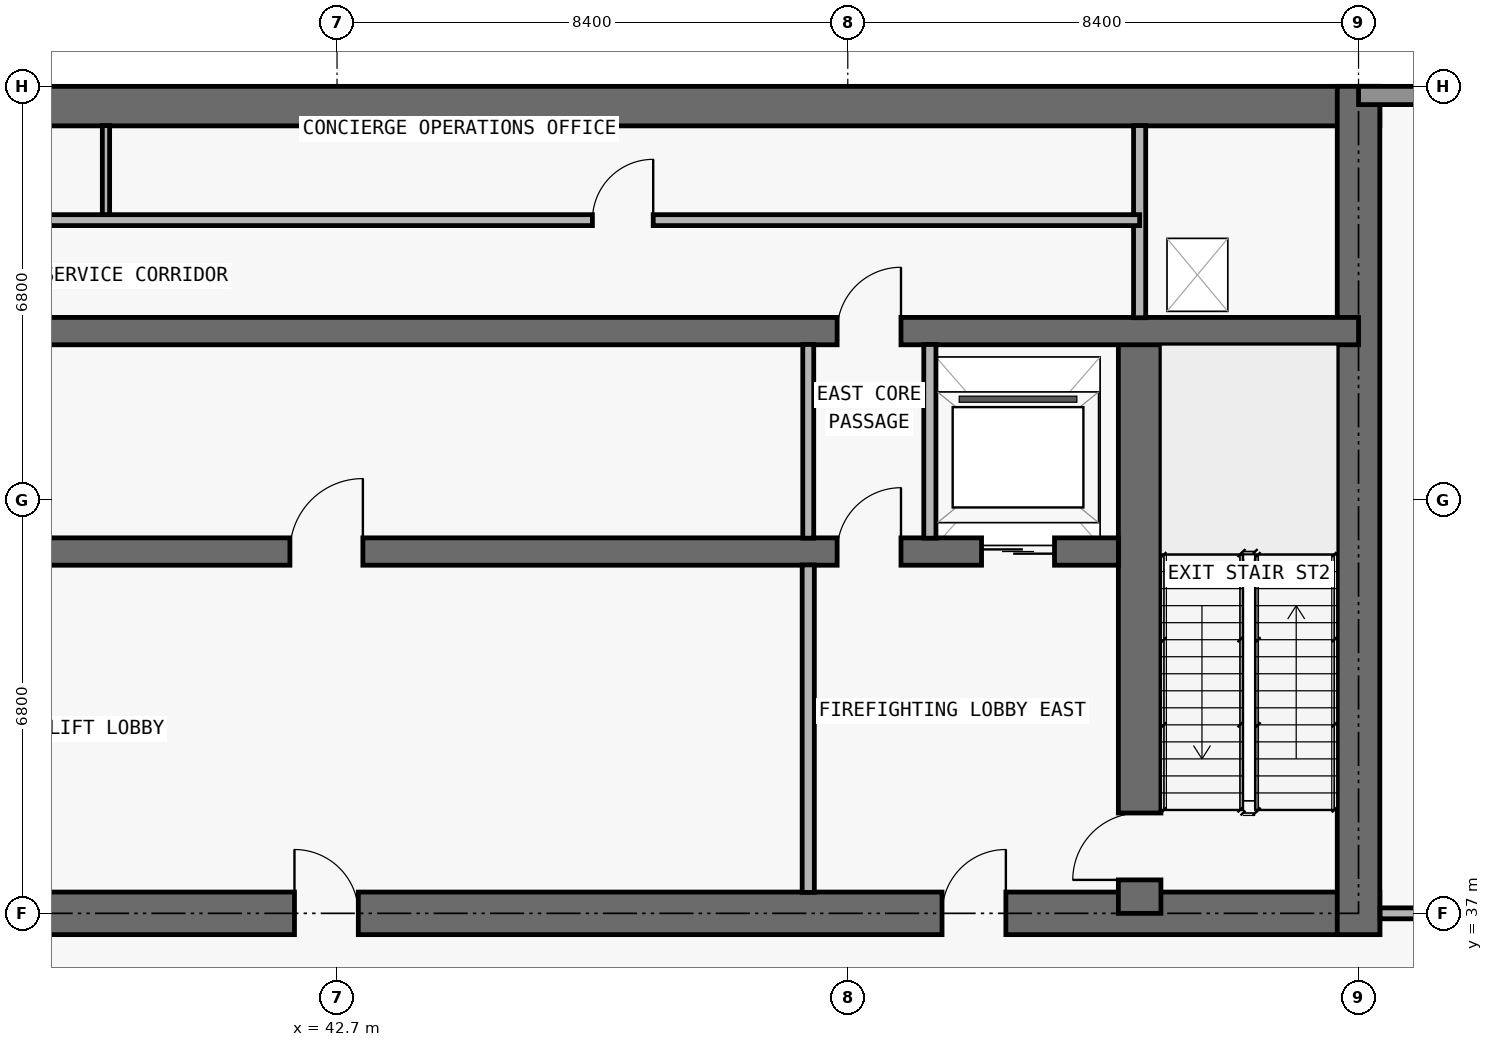
"""IFC4 building model, lengths in metres.
Left out: names, types, materials, properties, quantities, classifications, styles, units other than length and angle.
Written with IfcOpenShell. Run it as: python <this file> out.ifc"""

import sys

from ifc_helpers import new_model, si_unit, direction, frame, frame_2d, origin, place, context, subcontext, project, spatial, rectangle, extrude, element, fill, save


model = new_model("IFC4")
c1 = context("Model", 3, precision=1e-05, world=origin(), true_north=direction((0.0, 1.0)))
c2 = subcontext(c1, "Body", "Model", "MODEL_VIEW")
j1 = project(units=[si_unit("LENGTHUNIT", "METRE"), si_unit("PLANEANGLEUNIT", "RADIAN")], contexts=[c1])
p1 = place(None, origin())
s1 = spatial("IfcSite", under=j1, at=p1, CompositionType="ELEMENT")
p2 = place(p1, origin())
s2 = spatial("IfcBuilding", under=s1, at=p2, CompositionType="ELEMENT")
p3 = place(p2, frame((0.0, 0.0, 284.8)))
s3 = spatial("IfcBuildingStorey", under=s2, at=p3, CompositionType="ELEMENT", Elevation=284.8)
p4 = place(p3, frame((17.95, 37.0, 0.0), z_axis=(0.0, 0.0, 1.0), x_axis=(1.0, 0.0, 0.0)))
e1 = element("IfcWall", 1, at=p4, inside=s3, PredefinedType="SHEAR", context=c2, shape_type="SweptSolid", body=[
    extrude(rectangle(XDim=41.9, YDim=0.7, at=frame_2d((20.95, 0.0))), origin(), (0.0, 0.0, 1.0), 5.1),
])
p5 = place(p4, frame((14.312, 0.0, 0.0)))
e2 = element("IfcOpeningElement", 2, at=p5, cuts=e1, PredefinedType="OPENING", context=c2, shape_type="SweptSolid", body=[
    extrude(rectangle(XDim=1.2, YDim=2.2, at=frame_2d((0.6, 1.1))), frame((0.0, 0.36, 0.0), z_axis=(0.0, -1.0, 0.0), x_axis=(1.0, 0.0, 0.0)), (0.0, 0.0, 1.0), 0.72),
])
p6 = place(p4, frame((6.2, 0.0, 0.0)))
e3 = element("IfcOpeningElement", 3, at=p6, cuts=e1, PredefinedType="OPENING", context=c2, shape_type="SweptSolid", body=[
    extrude(rectangle(XDim=1.05, YDim=2.15, at=frame_2d((0.525, 1.075))), frame((0.0, 0.36, 0.0), z_axis=(0.0, -1.0, 0.0), x_axis=(1.0, 0.0, 0.0)), (0.0, 0.0, 1.0), 0.72),
])
p7 = place(p4, frame((34.7, 0.0, 0.0)))
e4 = element("IfcOpeningElement", 4, at=p7, cuts=e1, PredefinedType="OPENING", context=c2, shape_type="SweptSolid", body=[
    extrude(rectangle(XDim=1.05, YDim=2.15, at=frame_2d((0.525, 1.075))), frame((0.0, 0.36, 0.0), z_axis=(0.0, -1.0, 0.0), x_axis=(1.0, 0.0, 0.0)), (0.0, 0.0, 1.0), 0.72),
])
p8 = place(p4, frame((10.812, 0.0, 0.0)))
e5 = element("IfcOpeningElement", 5, at=p8, cuts=e1, PredefinedType="OPENING", context=c2, shape_type="SweptSolid", body=[
    extrude(rectangle(XDim=1.05, YDim=2.15, at=frame_2d((0.525, 1.075))), frame((0.0, 0.36, 0.0), z_axis=(0.0, -1.0, 0.0), x_axis=(1.0, 0.0, 0.0)), (0.0, 0.0, 1.0), 0.72),
])
p9 = place(p4, frame((24.05, 0.0, 0.0)))
e6 = element("IfcOpeningElement", 6, at=p9, cuts=e1, PredefinedType="OPENING", context=c2, shape_type="SweptSolid", body=[
    extrude(rectangle(XDim=1.05, YDim=2.15, at=frame_2d((0.525, 1.075))), frame((0.0, 0.36, 0.0), z_axis=(0.0, -1.0, 0.0), x_axis=(1.0, 0.0, 0.0)), (0.0, 0.0, 1.0), 0.72),
])
p10 = place(p3, frame((17.95, 50.275, 0.0), z_axis=(0.0, 0.0, 1.0), x_axis=(1.0, 0.0, 0.0)))
e7 = element("IfcWall", 7, at=p10, inside=s3, PredefinedType="SHEAR", context=c2, shape_type="SweptSolid", body=[
    extrude(rectangle(XDim=41.9, YDim=0.65, at=frame_2d((20.95, 0.0))), origin(), (0.0, 0.0, 1.0), 5.1),
])
p11 = place(p3, frame((59.5, 36.65, 0.0), z_axis=(0.0, 0.0, 1.0), x_axis=(0.0, 1.0, 0.0)))
e8 = element("IfcWall", 8, at=p11, inside=s3, PredefinedType="SHEAR", context=c2, shape_type="SweptSolid", body=[
    extrude(rectangle(XDim=13.95, YDim=0.7, at=frame_2d((6.975, 0.0))), origin(), (0.0, 0.0, 1.0), 5.1),
])
p12 = place(p3, frame((55.9, 37.0, 0.0), z_axis=(0.0, 0.0, 1.0), x_axis=(0.0, 1.0, 0.0)))
e9 = element("IfcWall", 9, at=p12, inside=s3, PredefinedType="SHEAR", context=c2, shape_type="SweptSolid", body=[
    extrude(rectangle(XDim=9.575, YDim=0.7, at=frame_2d((4.788, 0.0))), origin(), (0.0, 0.0, 1.0), 5.1),
])
p13 = place(p12, frame((0.55, 0.0, 0.0)))
e10 = element("IfcOpeningElement", 10, at=p13, cuts=e9, PredefinedType="OPENING", context=c2, shape_type="SweptSolid", body=[
    extrude(rectangle(XDim=1.1, YDim=2.15, at=frame_2d((0.55, 1.075))), frame((0.0, 0.36, 0.0), z_axis=(0.0, -1.0, 0.0), x_axis=(1.0, 0.0, 0.0)), (0.0, 0.0, 1.0), 0.72),
])
p14 = place(p3, frame((22.25, 42.95, 0.0), z_axis=(0.0, 0.0, 1.0), x_axis=(1.0, 0.0, 0.0)))
e11 = element("IfcWall", 11, at=p14, inside=s3, PredefinedType="SHEAR", context=c2, shape_type="SweptSolid", body=[
    extrude(rectangle(XDim=33.3, YDim=0.45, at=frame_2d((16.65, 0.0))), origin(), (0.0, 0.0, 1.0), 5.1),
])
p15 = place(p14, frame((1.05, 0.0, 0.0)))
e12 = element("IfcOpeningElement", 12, at=p15, cuts=e11, PredefinedType="OPENING", context=c2, shape_type="SweptSolid", body=[
    extrude(rectangle(XDim=1.2, YDim=2.2, at=frame_2d((0.6, 1.1))), frame((0.0, 0.235, 0.0), z_axis=(0.0, -1.0, 0.0), x_axis=(1.0, 0.0, 0.0)), (0.0, 0.0, 1.0), 0.47),
])
p16 = place(p14, frame((31.05, 0.0, 0.0)))
e13 = element("IfcOpeningElement", 13, at=p16, cuts=e11, PredefinedType="OPENING", context=c2, shape_type="SweptSolid", body=[
    extrude(rectangle(XDim=1.2, YDim=2.2, at=frame_2d((0.6, 1.1))), frame((0.0, 0.235, 0.0), z_axis=(0.0, -1.0, 0.0), x_axis=(1.0, 0.0, 0.0)), (0.0, 0.0, 1.0), 0.47),
])
p17 = place(p14, frame((3.625, 0.0, 0.0)))
e14 = element("IfcOpeningElement", 14, at=p17, cuts=e11, PredefinedType="OPENING", context=c2, shape_type="SweptSolid", body=[
    extrude(rectangle(XDim=1.05, YDim=2.15, at=frame_2d((0.525, 1.075))), frame((0.0, 0.235, 0.0), z_axis=(0.0, -1.0, 0.0), x_axis=(1.0, 0.0, 0.0)), (0.0, 0.0, 1.0), 0.47),
])
p18 = place(p14, frame((28.675, 0.0, 0.0)))
e15 = element("IfcOpeningElement", 15, at=p18, cuts=e11, PredefinedType="OPENING", context=c2, shape_type="SweptSolid", body=[
    extrude(rectangle(XDim=1.05, YDim=2.15, at=frame_2d((0.525, 1.075))), frame((0.0, 0.235, 0.0), z_axis=(0.0, -1.0, 0.0), x_axis=(1.0, 0.0, 0.0)), (0.0, 0.0, 1.0), 0.47),
])
p19 = place(p14, frame((6.538, 0.0, 0.0)))
e16 = element("IfcOpeningElement", 16, at=p19, cuts=e11, PredefinedType="OPENING", context=c2, shape_type="SweptSolid", body=[
    extrude(rectangle(XDim=1.0, YDim=2.2, at=frame_2d((0.5, 1.1))), frame((0.0, 0.235, 0.0), z_axis=(0.0, -1.0, 0.0), x_axis=(1.0, 0.0, 0.0)), (0.0, 0.0, 1.0), 0.47),
])
p20 = place(p14, frame((19.675, 0.0, 0.0)))
e17 = element("IfcOpeningElement", 17, at=p20, cuts=e11, PredefinedType="OPENING", context=c2, shape_type="SweptSolid", body=[
    extrude(rectangle(XDim=1.2, YDim=2.2, at=frame_2d((0.6, 1.1))), frame((0.0, 0.235, 0.0), z_axis=(0.0, -1.0, 0.0), x_axis=(1.0, 0.0, 0.0)), (0.0, 0.0, 1.0), 0.47),
])
p21 = place(p3, frame((18.3, 46.575, 0.0), z_axis=(0.0, 0.0, 1.0), x_axis=(1.0, 0.0, 0.0)))
e18 = element("IfcWall", 18, at=p21, inside=s3, PredefinedType="SHEAR", context=c2, shape_type="SweptSolid", body=[
    extrude(rectangle(XDim=41.2, YDim=0.45, at=frame_2d((20.6, 0.0))), origin(), (0.0, 0.0, 1.0), 5.1),
])
p22 = place(p21, frame((7.575, 0.0, 0.0)))
e19 = element("IfcOpeningElement", 19, at=p22, cuts=e18, PredefinedType="OPENING", context=c2, shape_type="SweptSolid", body=[
    extrude(rectangle(XDim=1.05, YDim=2.15, at=frame_2d((0.525, 1.075))), frame((0.0, 0.235, 0.0), z_axis=(0.0, -1.0, 0.0), x_axis=(1.0, 0.0, 0.0)), (0.0, 0.0, 1.0), 0.47),
])
p23 = place(p21, frame((32.625, 0.0, 0.0)))
e20 = element("IfcOpeningElement", 20, at=p23, cuts=e18, PredefinedType="OPENING", context=c2, shape_type="SweptSolid", body=[
    extrude(rectangle(XDim=1.05, YDim=2.15, at=frame_2d((0.525, 1.075))), frame((0.0, 0.235, 0.0), z_axis=(0.0, -1.0, 0.0), x_axis=(1.0, 0.0, 0.0)), (0.0, 0.0, 1.0), 0.47),
])
p24 = place(p3, frame((59.5, 50.45, 0.0), z_axis=(0.0, 0.0, 1.0), x_axis=(1.0, 0.0, 0.0)))
e21 = element("IfcWall", 21, at=p24, inside=s3, PredefinedType="STANDARD", context=c2, shape_type="SweptSolid", body=[
    extrude(rectangle(XDim=1.8, YDim=0.3, at=frame_2d((0.9, 0.0))), origin(), (0.0, 0.0, 1.0), 5.1),
])
p25 = place(p3, frame((38.9, 48.4, 0.0), z_axis=(0.0, 0.0, 1.0), x_axis=(0.0, 1.0, 0.0)))
e22 = element("IfcWall", 22, at=p25, inside=s3, PredefinedType="PARTITIONING", context=c2, shape_type="SweptSolid", body=[
    extrude(rectangle(XDim=1.555, YDim=0.12, at=frame_2d((0.778, 0.0))), origin(), (0.0, 0.0, 1.0), 5.1),
])
p26 = place(p3, frame((50.45, 37.345, 0.0), z_axis=(0.0, 0.0, 1.0), x_axis=(0.0, 1.0, 0.0)))
e23 = element("IfcWall", 23, at=p26, inside=s3, PredefinedType="PARTITIONING", context=c2, shape_type="SweptSolid", body=[
    extrude(rectangle(XDim=5.385, YDim=0.2, at=frame_2d((2.692, 0.0))), origin(), (0.0, 0.0, 1.0), 5.1),
])
p27 = place(p3, frame((50.45, 43.17, 0.0), z_axis=(0.0, 0.0, 1.0), x_axis=(0.0, 1.0, 0.0)))
e24 = element("IfcWall", 24, at=p27, inside=s3, PredefinedType="PARTITIONING", context=c2, shape_type="SweptSolid", body=[
    extrude(rectangle(XDim=3.185, YDim=0.18, at=frame_2d((1.593, 0.0))), origin(), (0.0, 0.0, 1.0), 5.1),
])
p28 = place(p3, frame((52.45, 43.17, 0.0), z_axis=(0.0, 0.0, 1.0), x_axis=(0.0, 1.0, 0.0)))
e25 = element("IfcWall", 25, at=p28, inside=s3, PredefinedType="PARTITIONING", context=c2, shape_type="SweptSolid", body=[
    extrude(rectangle(XDim=3.185, YDim=0.2, at=frame_2d((1.593, 0.0))), origin(), (0.0, 0.0, 1.0), 5.1),
])
p29 = place(p3, frame((55.9, 46.795, 0.0), z_axis=(0.0, 0.0, 1.0), x_axis=(0.0, 1.0, 0.0)))
e26 = element("IfcWall", 26, at=p29, inside=s3, PredefinedType="PARTITIONING", context=c2, shape_type="SweptSolid", body=[
    extrude(rectangle(XDim=3.16, YDim=0.2, at=frame_2d((1.58, 0.0))), origin(), (0.0, 0.0, 1.0), 5.1),
])
p30 = place(p3, frame((59.855, 37.0, 0.0), z_axis=(0.0, 0.0, 1.0), x_axis=(1.0, 0.0, 0.0)))
e27 = element("IfcWall", 27, at=p30, inside=s3, PredefinedType="PARTITIONING", context=c2, shape_type="SweptSolid", body=[
    extrude(rectangle(XDim=1.445, YDim=0.18, at=frame_2d((0.723, 0.0))), origin(), (0.0, 0.0, 1.0), 5.1),
])
p31 = place(p3, frame((21.9, 48.4, 0.0), z_axis=(0.0, 0.0, 1.0), x_axis=(1.0, 0.0, 0.0)))
e28 = element("IfcWall", 28, at=p31, inside=s3, PredefinedType="PARTITIONING", context=c2, shape_type="SweptSolid", body=[
    extrude(rectangle(XDim=34.0, YDim=0.18, at=frame_2d((17.0, 0.0))), origin(), (0.0, 0.0, 1.0), 5.1),
])
p32 = place(p31, frame((8.0, 0.0, 0.0)))
e29 = element("IfcOpeningElement", 29, at=p32, cuts=e28, PredefinedType="OPENING", context=c2, shape_type="SweptSolid", body=[
    extrude(rectangle(XDim=1.0, YDim=2.2, at=frame_2d((0.5, 1.1))), frame((0.0, 0.1, 0.0), z_axis=(0.0, -1.0, 0.0), x_axis=(1.0, 0.0, 0.0)), (0.0, 0.0, 1.0), 0.2),
])
p33 = place(p31, frame((25.0, 0.0, 0.0)))
e30 = element("IfcOpeningElement", 30, at=p33, cuts=e28, PredefinedType="OPENING", context=c2, shape_type="SweptSolid", body=[
    extrude(rectangle(XDim=1.0, YDim=2.2, at=frame_2d((0.5, 1.1))), frame((0.0, 0.1, 0.0), z_axis=(0.0, -1.0, 0.0), x_axis=(1.0, 0.0, 0.0)), (0.0, 0.0, 1.0), 0.2),
])
p34 = place(p16, origin())
e31 = element("IfcDoor", 31, at=p34, inside=s3, OperationType="DOUBLE_DOOR_SLIDING", PredefinedType="DOOR", context=c2, shape_type="SweptSolid", body=[
    extrude(rectangle(XDim=1.2, YDim=2.2, at=frame_2d((0.6, 1.1))), frame((0.0, 0.025, 0.0), z_axis=(0.0, -1.0, 0.0), x_axis=(1.0, 0.0, 0.0)), (0.0, 0.0, 1.0), 0.05),
])
fill(e13, e31)
p35 = place(p7, origin())
e32 = element("IfcDoor", 32, at=p35, inside=s3, OperationType="SINGLE_SWING_RIGHT", PredefinedType="DOOR", context=c2, shape_type="SweptSolid", body=[
    extrude(rectangle(XDim=1.05, YDim=2.15, at=frame_2d((0.525, 1.075))), frame((0.0, 0.025, 0.0), z_axis=(0.0, -1.0, 0.0), x_axis=(1.0, 0.0, 0.0)), (0.0, 0.0, 1.0), 0.05),
])
fill(e4, e32)
p36 = place(p13, origin())
e33 = element("IfcDoor", 33, at=p36, inside=s3, OperationType="SINGLE_SWING_LEFT", PredefinedType="DOOR", context=c2, shape_type="SweptSolid", body=[
    extrude(rectangle(XDim=1.1, YDim=2.15, at=frame_2d((0.55, 1.075))), frame((0.0, 0.025, 0.0), z_axis=(0.0, -1.0, 0.0), x_axis=(1.0, 0.0, 0.0)), (0.0, 0.0, 1.0), 0.05),
])
fill(e10, e33)
p37 = place(p18, origin())
e34 = element("IfcDoor", 34, at=p37, inside=s3, OperationType="SINGLE_SWING_RIGHT", PredefinedType="DOOR", context=c2, shape_type="SweptSolid", body=[
    extrude(rectangle(XDim=1.05, YDim=2.15, at=frame_2d((0.525, 1.075))), frame((0.0, 0.025, 0.0), z_axis=(0.0, -1.0, 0.0), x_axis=(1.0, 0.0, 0.0)), (0.0, 0.0, 1.0), 0.05),
])
fill(e15, e34)
p38 = place(p9, origin())
e35 = element("IfcDoor", 35, at=p38, inside=s3, OperationType="SINGLE_SWING_LEFT", PredefinedType="DOOR", context=c2, shape_type="SweptSolid", body=[
    extrude(rectangle(XDim=1.05, YDim=2.15, at=frame_2d((0.525, 1.075))), frame((0.0, 0.025, 0.0), z_axis=(0.0, -1.0, 0.0), x_axis=(1.0, 0.0, 0.0)), (0.0, 0.0, 1.0), 0.05),
])
fill(e6, e35)
p39 = place(p20, origin())
e36 = element("IfcDoor", 36, at=p39, inside=s3, OperationType="SINGLE_SWING_RIGHT", PredefinedType="DOOR", context=c2, shape_type="SweptSolid", body=[
    extrude(rectangle(XDim=1.2, YDim=2.2, at=frame_2d((0.6, 1.1))), frame((0.0, 0.025, 0.0), z_axis=(0.0, -1.0, 0.0), x_axis=(1.0, 0.0, 0.0)), (0.0, 0.0, 1.0), 0.05),
])
fill(e17, e36)
p40 = place(p23, origin())
e37 = element("IfcDoor", 37, at=p40, inside=s3, OperationType="SINGLE_SWING_RIGHT", PredefinedType="DOOR", context=c2, shape_type="SweptSolid", body=[
    extrude(rectangle(XDim=1.05, YDim=2.15, at=frame_2d((0.525, 1.075))), frame((0.0, 0.025, 0.0), z_axis=(0.0, -1.0, 0.0), x_axis=(1.0, 0.0, 0.0)), (0.0, 0.0, 1.0), 0.05),
])
fill(e20, e37)
p41 = place(p33, origin())
e38 = element("IfcDoor", 38, at=p41, inside=s3, OperationType="SINGLE_SWING_RIGHT", PredefinedType="DOOR", context=c2, shape_type="SweptSolid", body=[
    extrude(rectangle(XDim=1.0, YDim=2.2, at=frame_2d((0.5, 1.1))), frame((0.0, 0.025, 0.0), z_axis=(0.0, -1.0, 0.0), x_axis=(1.0, 0.0, 0.0)), (0.0, 0.0, 1.0), 0.05),
])
fill(e30, e38)
save(model, sys.argv[1])
